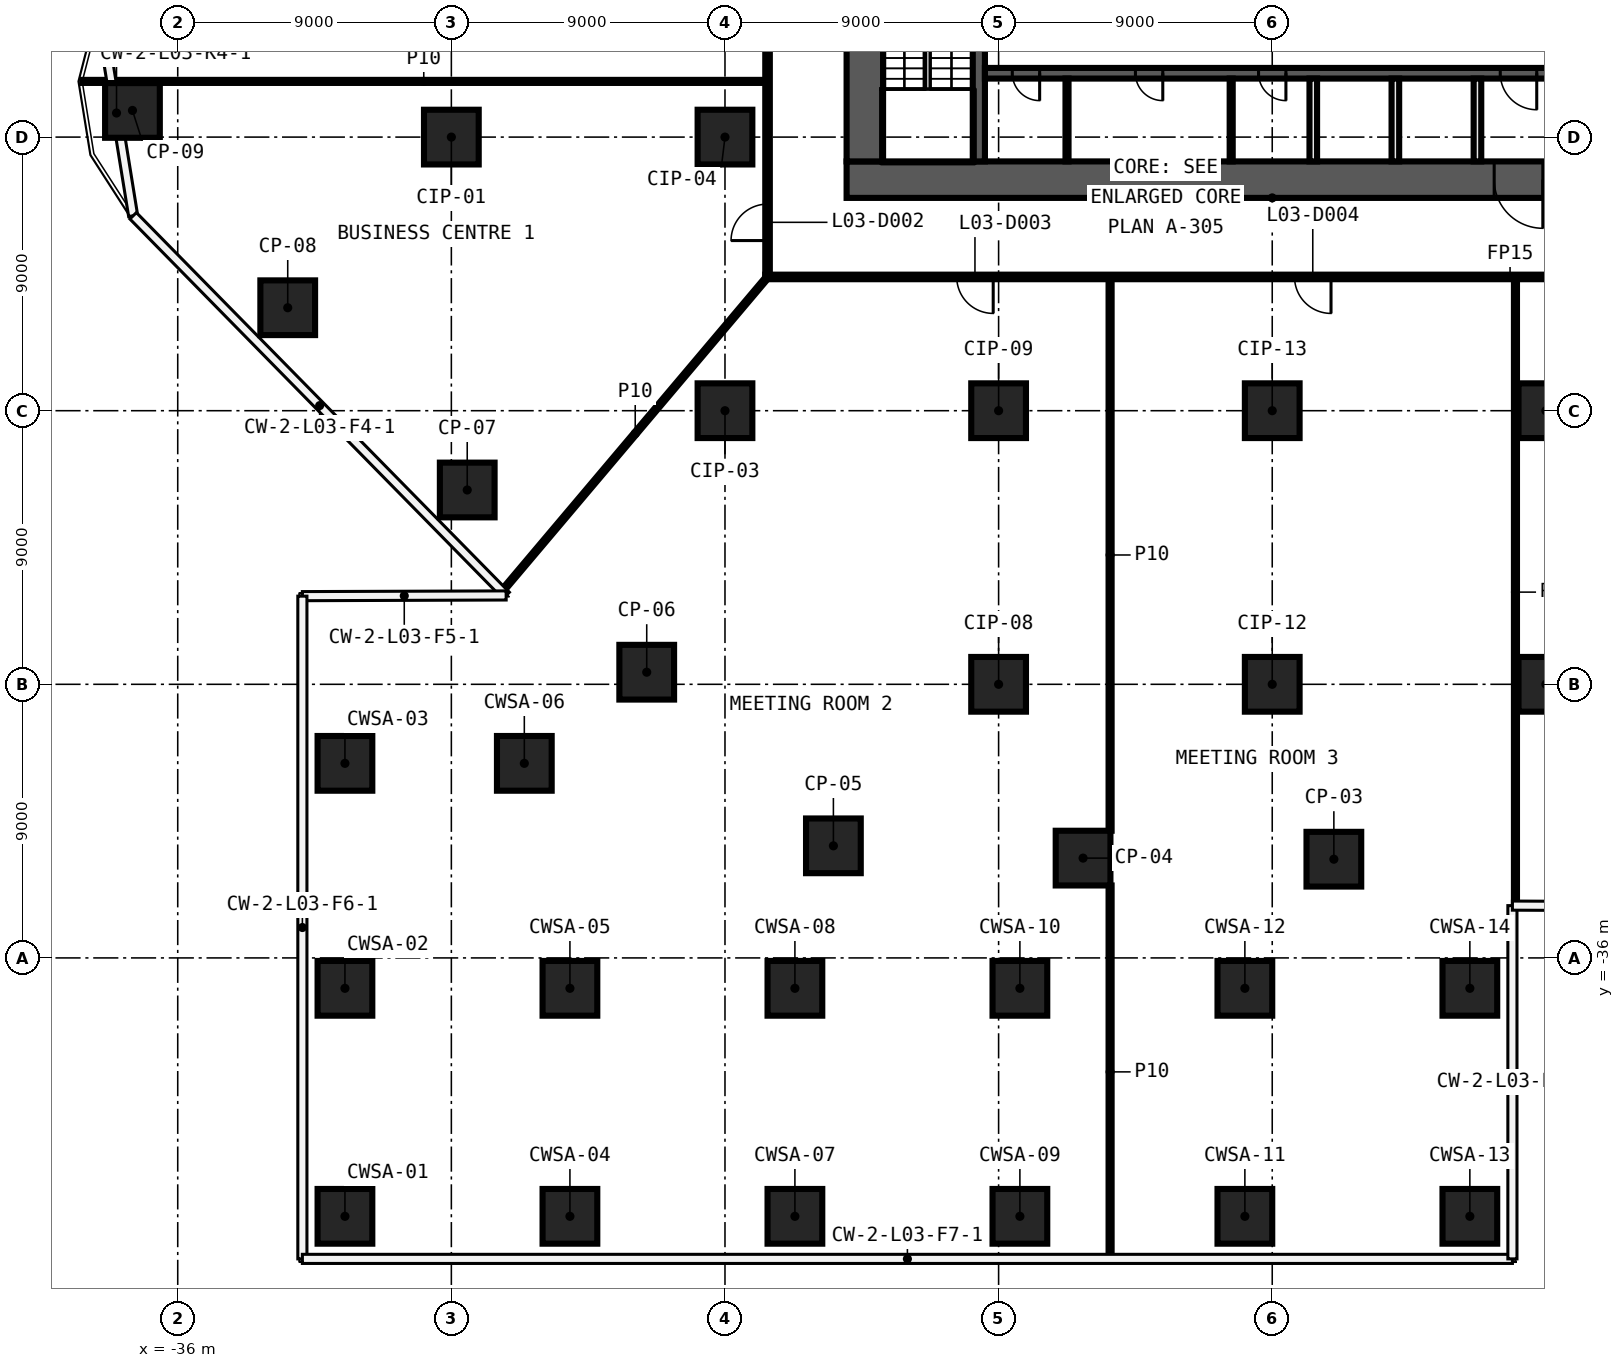
"""IFC4 building model, lengths in metres.
Left out: names, types, materials, properties, quantities, classifications, styles, units other than length and angle.
Written with IfcOpenShell. Run it as: python <this file> out.ifc"""

import sys

from ifc_helpers import new_model, si_unit, direction, frame, frame_2d, origin, origin_2d, place, context, subcontext, project, spatial, rectangle, extrude, element, fill, save


model = new_model("IFC4")
c1 = context("Model", 3, precision=1e-05, world=origin(), true_north=direction((0.0, 1.0)))
c2 = subcontext(c1, "Body", "Model", "MODEL_VIEW")
j1 = project(units=[si_unit("LENGTHUNIT", "METRE"), si_unit("PLANEANGLEUNIT", "RADIAN")], contexts=[c1])
p1 = place(None, origin())
s1 = spatial("IfcSite", under=j1, at=p1, CompositionType="ELEMENT")
p2 = place(p1, origin())
s2 = spatial("IfcBuilding", under=s1, at=p2, CompositionType="ELEMENT")
p3 = place(p2, frame((0.0, 0.0, 27.0)))
s3 = spatial("IfcBuildingStorey", under=s2, at=p3, CompositionType="ELEMENT", Elevation=27.0)
for number, where, z_axis, x_axis in (
    (1, (2.027, -32.753, 0.0), (0.0, 0.0, 1.0), (1.0, 0.0, 0.0)),
    (2, (-6.222, -32.717, 0.0), (0.0, 0.0, 1.0), (1.0, 0.0, 0.0)),
    (3, (-14.434, -32.313, 0.0), (0.0, 0.0, 1.0), (1.0, 0.0, 0.0)),
    (4, (-20.574, -26.602, 0.0), (0.0, 0.0, 1.0), (1.0, 0.0, 0.0)),
    (5, (-26.478, -20.608, 0.0), (0.0, 0.0, 1.0), (1.0, 0.0, 0.0)),
    (6, (-32.382, -14.613, 0.0), (0.0, 0.0, 1.0), (1.0, 0.0, 0.0)),
    (7, (-37.489, -8.123, 0.0), (0.0, 0.0, 1.0), (1.0, 0.0, 0.0)),
    (8, (-27.0, -9.0, 0.0), (0.0, 0.0, 1.0), (1.0, 0.0, 0.0)),
    (9, (-18.0, -18.0, 0.0), (0.0, 0.0, 1.0), (1.0, 0.0, 0.0)),
    (10, (-18.0, -9.0, 0.0), (0.0, 0.0, 1.0), (1.0, 0.0, 0.0)),
    (11, (-9.0, -27.0, 0.0), (0.0, 0.0, 1.0), (1.0, 0.0, 0.0)),
    (12, (-9.0, -18.0, 0.0), (0.0, 0.0, 1.0), (1.0, 0.0, 0.0)),
    (13, (0.0, -27.0, 0.0), (0.0, 0.0, 1.0), (1.0, 0.0, 0.0)),
    (14, (0.0, -18.0, 0.0), (0.0, 0.0, 1.0), (1.0, 0.0, 0.0)),
    (15, (9.0, -27.0, 0.0), (0.0, 0.0, 1.0), (1.0, 0.0, 0.0)),
    (16, (9.0, -18.0, 0.0), (0.0, 0.0, 1.0), (1.0, 0.0, 0.0)),
    (17, (-30.5, -44.5, 0.0), (0.0, 0.0, 1.0), (1.0, 0.0, 0.0)),
    (18, (-30.5, -37.0, 0.0), (0.0, 0.0, 1.0), (1.0, 0.0, 0.0)),
    (19, (-30.5, -29.6, 0.0), (0.0, 0.0, 1.0), (1.0, 0.0, 0.0)),
    (20, (-23.1, -44.5, 0.0), (0.0, 0.0, 1.0), (1.0, 0.0, 0.0)),
    (21, (-23.1, -37.0, 0.0), (0.0, 0.0, 1.0), (1.0, 0.0, 0.0)),
    (22, (-24.6, -29.6, 0.0), (0.0, 0.0, 1.0), (1.0, 0.0, 0.0)),
    (23, (-15.7, -44.5, 0.0), (0.0, 0.0, 1.0), (1.0, 0.0, 0.0)),
    (24, (-15.7, -37.0, 0.0), (0.0, 0.0, 1.0), (1.0, 0.0, 0.0)),
    (25, (-8.3, -44.5, 0.0), (0.0, 0.0, 1.0), (1.0, 0.0, 0.0)),
    (26, (-8.3, -37.0, 0.0), (0.0, 0.0, 1.0), (1.0, 0.0, 0.0)),
    (27, (-0.9, -44.5, 0.0), (0.0, 0.0, 1.0), (1.0, 0.0, 0.0)),
    (28, (-0.9, -37.0, 0.0), (0.0, 0.0, 1.0), (1.0, 0.0, 0.0)),
    (29, (6.5, -44.5, 0.0), (0.0, 0.0, 1.0), (1.0, 0.0, 0.0)),
    (30, (6.5, -37.0, 0.0), (0.0, 0.0, 1.0), (1.0, 0.0, 0.0)),
):
    element("IfcColumn", number, at=place(p3, frame(where, z_axis=z_axis, x_axis=x_axis)), inside=s3, PredefinedType="COLUMN", context=c2, shape_type="SweptSolid", body=[
        extrude(rectangle(XDim=1.8, YDim=1.8, at=origin_2d()), origin(), (0.0, 0.0, 1.0), 5.55),
    ])
p4 = place(p3, frame((16.675, -13.6, 0.0), z_axis=(0.0, 0.0, 1.0), x_axis=(-1.0, 0.0, 0.0)))
e31 = element("IfcWall", 31, at=p4, inside=s3, PredefinedType="PARTITIONING", context=c2, shape_type="SweptSolid", body=[
    extrude(rectangle(XDim=33.35, YDim=0.15, at=frame_2d((16.675, 0.0))), origin(), (0.0, 0.0, 1.0), 5.55),
])
p5 = place(p4, frame((25.853, 0.0, 0.0)))
e32 = element("IfcOpeningElement", 32, at=p5, cuts=e31, PredefinedType="OPENING", context=c2, shape_type="SweptSolid", body=[
    extrude(rectangle(XDim=1.2, YDim=2.1, at=frame_2d((0.6, 1.05))), frame((0.0, 0.085, 0.0), z_axis=(0.0, -1.0, 0.0), x_axis=(1.0, 0.0, 0.0)), (0.0, 0.0, 1.0), 0.17),
])
p6 = place(p4, frame((14.742, 0.0, 0.0)))
e33 = element("IfcOpeningElement", 33, at=p6, cuts=e31, PredefinedType="OPENING", context=c2, shape_type="SweptSolid", body=[
    extrude(rectangle(XDim=1.2, YDim=2.1, at=frame_2d((0.6, 1.05))), frame((0.0, 0.085, 0.0), z_axis=(0.0, -1.0, 0.0), x_axis=(1.0, 0.0, 0.0)), (0.0, 0.0, 1.0), 0.17),
])
p7 = place(p4, frame((1.764, 0.0, 0.0)))
e34 = element("IfcOpeningElement", 34, at=p7, cuts=e31, PredefinedType="OPENING", context=c2, shape_type="SweptSolid", body=[
    extrude(rectangle(XDim=1.2, YDim=2.1, at=frame_2d((0.6, 1.05))), frame((0.0, 0.085, 0.0), z_axis=(0.0, -1.0, 0.0), x_axis=(1.0, 0.0, 0.0)), (0.0, 0.0, 1.0), 0.17),
])
p8 = place(p3, frame((-39.14, -7.168, 0.0), z_axis=(0.0, 0.0, 1.0), x_axis=(1.0, 0.0, 0.0)))
e35 = element("IfcWall", 35, at=p8, inside=s3, PredefinedType="PARTITIONING", context=c2, shape_type="SweptSolid", body=[
    extrude(rectangle(XDim=22.465, YDim=0.1, at=frame_2d((11.232, 0.0))), origin(), (0.0, 0.0, 1.0), 5.55),
])
p9 = place(p3, frame((-25.304, -23.908, 0.0), z_axis=(0.0, 0.0, 1.0), x_axis=(0.645188329464, 0.764023572623, 0.0)))
e36 = element("IfcWall", 36, at=p9, inside=s3, PredefinedType="PARTITIONING", context=c2, shape_type="SweptSolid", body=[
    extrude(rectangle(XDim=13.491, YDim=0.1, at=frame_2d((6.746, 0.0))), origin(), (0.0, 0.0, 1.0), 5.55),
])
p10 = place(p3, frame((8.0, -34.26, 0.0), z_axis=(0.0, 0.0, 1.0), x_axis=(0.0, 1.0, 0.0)))
e37 = element("IfcWall", 37, at=p10, inside=s3, PredefinedType="PARTITIONING", context=c2, shape_type="SweptSolid", body=[
    extrude(rectangle(XDim=20.585, YDim=0.1, at=frame_2d((10.292, 0.0))), origin(), (0.0, 0.0, 1.0), 5.55),
])
p11 = place(p3, frame((-5.333, -45.88, 0.0), z_axis=(0.0, 0.0, 1.0), x_axis=(0.0, 1.0, 0.0)))
e38 = element("IfcWall", 38, at=p11, inside=s3, PredefinedType="PARTITIONING", context=c2, shape_type="SweptSolid", body=[
    extrude(rectangle(XDim=12.263, YDim=0.1, at=frame_2d((6.131, 0.0))), origin(), (0.0, 0.0, 1.0), 5.55),
])
p12 = place(p3, frame((-5.333, -31.817, 0.0), z_axis=(0.0, 0.0, 1.0), x_axis=(0.0, 1.0, 0.0)))
e39 = element("IfcWall", 39, at=p12, inside=s3, PredefinedType="PARTITIONING", context=c2, shape_type="SweptSolid", body=[
    extrude(rectangle(XDim=18.142, YDim=0.1, at=frame_2d((9.071, 0.0))), origin(), (0.0, 0.0, 1.0), 5.55),
])
p13 = place(p3, frame((-16.6, -13.525, 0.0), z_axis=(0.0, 0.0, 1.0), x_axis=(0.0, 1.0, 0.0)))
e40 = element("IfcWall", 40, at=p13, inside=s3, PredefinedType="PARTITIONING", context=c2, shape_type="SweptSolid", body=[
    extrude(rectangle(XDim=27.05, YDim=0.15, at=frame_2d((13.525, 0.0))), origin(), (0.0, 0.0, 1.0), 5.55),
])
p14 = place(p13, frame((16.028, 0.0, 0.0)))
e41 = element("IfcOpeningElement", 41, at=p14, cuts=e40, PredefinedType="OPENING", context=c2, shape_type="SweptSolid", body=[
    extrude(rectangle(XDim=1.2, YDim=2.1, at=frame_2d((0.6, 1.05))), frame((0.0, 0.085, 0.0), z_axis=(0.0, -1.0, 0.0), x_axis=(1.0, 0.0, 0.0)), (0.0, 0.0, 1.0), 0.17),
])
p15 = place(p13, frame((1.121, 0.0, 0.0)))
e42 = element("IfcOpeningElement", 42, at=p15, cuts=e40, PredefinedType="OPENING", context=c2, shape_type="SweptSolid", body=[
    extrude(rectangle(XDim=1.2, YDim=2.1, at=frame_2d((0.6, 1.05))), frame((0.0, 0.085, 0.0), z_axis=(0.0, -1.0, 0.0), x_axis=(1.0, 0.0, 0.0)), (0.0, 0.0, 1.0), 0.17),
])
p16 = place(p13, frame((24.705, 0.0, 0.0)))
e43 = element("IfcOpeningElement", 43, at=p16, cuts=e40, PredefinedType="OPENING", context=c2, shape_type="SweptSolid", body=[
    extrude(rectangle(XDim=1.2, YDim=2.1, at=frame_2d((0.6, 1.05))), frame((0.0, 0.085, 0.0), z_axis=(0.0, -1.0, 0.0), x_axis=(1.0, 0.0, 0.0)), (0.0, 0.0, 1.0), 0.17),
])
p17 = place(p3, frame((14.0, -10.4, 0.0), z_axis=(0.0, 0.0, 1.0), x_axis=(-1.0, 0.0, 0.0)))
e44 = element("IfcWall", 44, at=p17, inside=s3, PredefinedType="SHEAR", context=c2, shape_type="SweptSolid", body=[
    extrude(rectangle(XDim=28.0, YDim=1.2, at=frame_2d((14.0, 0.0))), origin(), (0.0, 0.0, 1.0), 5.55),
])
p18 = place(p17, frame((5.1, 0.0, 0.0)))
e45 = element("IfcOpeningElement", 45, at=p18, cuts=e44, PredefinedType="OPENING", context=c2, shape_type="SweptSolid", body=[
    extrude(rectangle(XDim=1.6, YDim=2.1, at=frame_2d((0.8, 1.05))), frame((0.0, 0.61, 0.0), z_axis=(0.0, -1.0, 0.0), x_axis=(1.0, 0.0, 0.0)), (0.0, 0.0, 1.0), 1.22),
])
p19 = place(p3, frame((-13.4, -9.8, 0.0), z_axis=(0.0, 0.0, 1.0), x_axis=(0.0, 1.0, 0.0)))
e46 = element("IfcWall", 46, at=p19, inside=s3, PredefinedType="SHEAR", context=c2, shape_type="SweptSolid", body=[
    extrude(rectangle(XDim=19.6, YDim=1.2, at=frame_2d((9.8, 0.0))), origin(), (0.0, 0.0, 1.0), 5.55),
])
p20 = place(p3, frame((-9.65, -9.8, 0.0), z_axis=(0.0, 0.0, 1.0), x_axis=(0.0, 1.0, 0.0)))
e47 = element("IfcWall", 47, at=p20, inside=s3, PredefinedType="SHEAR", context=c2, shape_type="SweptSolid", body=[
    extrude(rectangle(XDim=7.5, YDim=0.4, at=frame_2d((3.75, 0.0))), origin(), (0.0, 0.0, 1.0), 5.55),
])
p21 = place(p20, frame((5.1, 0.0, 0.0)))
e48 = element("IfcOpeningElement", 48, at=p21, cuts=e47, PredefinedType="OPENING", context=c2, shape_type="SweptSolid", body=[
    extrude(rectangle(XDim=1.2, YDim=2.1, at=frame_2d((0.6, 1.05))), frame((0.0, 0.21, 0.0), z_axis=(0.0, -1.0, 0.0), x_axis=(1.0, 0.0, 0.0)), (0.0, 0.0, 1.0), 0.42),
])
p22 = place(p3, frame((9.45, -6.9, 0.0), z_axis=(0.0, 0.0, 1.0), x_axis=(-1.0, 0.0, 0.0)))
e49 = element("IfcWall", 49, at=p22, inside=s3, PredefinedType="SHEAR", context=c2, shape_type="SweptSolid", body=[
    extrude(rectangle(XDim=18.9, YDim=0.35, at=frame_2d((9.45, 0.0))), origin(), (0.0, 0.0, 1.0), 5.55),
])
p23 = place(p22, frame((0.75, 0.0, 0.0)))
e50 = element("IfcOpeningElement", 50, at=p23, cuts=e49, PredefinedType="OPENING", context=c2, shape_type="SweptSolid", body=[
    extrude(rectangle(XDim=1.2, YDim=2.1, at=frame_2d((0.6, 1.05))), frame((0.0, 0.185, 0.0), z_axis=(0.0, -1.0, 0.0), x_axis=(1.0, 0.0, 0.0)), (0.0, 0.0, 1.0), 0.37),
])
p24 = place(p22, frame((17.1, 0.0, 0.0)))
e51 = element("IfcOpeningElement", 51, at=p24, cuts=e49, PredefinedType="OPENING", context=c2, shape_type="SweptSolid", body=[
    extrude(rectangle(XDim=0.9, YDim=2.1, at=frame_2d((0.45, 1.05))), frame((0.0, 0.185, 0.0), z_axis=(0.0, -1.0, 0.0), x_axis=(1.0, 0.0, 0.0)), (0.0, 0.0, 1.0), 0.37),
])
p25 = place(p22, frame((13.05, 0.0, 0.0)))
e52 = element("IfcOpeningElement", 52, at=p25, cuts=e49, PredefinedType="OPENING", context=c2, shape_type="SweptSolid", body=[
    extrude(rectangle(XDim=0.9, YDim=2.1, at=frame_2d((0.45, 1.05))), frame((0.0, 0.185, 0.0), z_axis=(0.0, -1.0, 0.0), x_axis=(1.0, 0.0, 0.0)), (0.0, 0.0, 1.0), 0.37),
])
p26 = place(p22, frame((9.0, 0.0, 0.0)))
e53 = element("IfcOpeningElement", 53, at=p26, cuts=e49, PredefinedType="OPENING", context=c2, shape_type="SweptSolid", body=[
    extrude(rectangle(XDim=0.9, YDim=2.1, at=frame_2d((0.45, 1.05))), frame((0.0, 0.185, 0.0), z_axis=(0.0, -1.0, 0.0), x_axis=(1.0, 0.0, 0.0)), (0.0, 0.0, 1.0), 0.37),
])
for number, where, z_axis, x_axis in (
    (54, (6.75, -9.8, 0.0), (0.0, 0.0, 1.0), (0.0, 1.0, 0.0)),
    (55, (4.05, -9.8, 0.0), (0.0, 0.0, 1.0), (0.0, 1.0, 0.0)),
    (56, (1.35, -9.8, 0.0), (0.0, 0.0, 1.0), (0.0, 1.0, 0.0)),
):
    element("IfcWall", number, at=place(p3, frame(where, z_axis=z_axis, x_axis=x_axis)), inside=s3, PredefinedType="SOLIDWALL", context=c2, shape_type="SweptSolid", body=[
        extrude(rectangle(XDim=2.725, YDim=0.25, at=frame_2d((1.363, 0.0))), origin(), (0.0, 0.0, 1.0), 5.55),
    ])
for number, where, z_axis, x_axis in (
    (57, (-1.35, -9.8, 0.0), (0.0, 0.0, 1.0), (0.0, 1.0, 0.0)),
    (58, (-6.75, -9.8, 0.0), (0.0, 0.0, 1.0), (0.0, 1.0, 0.0)),
):
    element("IfcWall", number, at=place(p3, frame(where, z_axis=z_axis, x_axis=x_axis)), inside=s3, PredefinedType="PARTITIONING", context=c2, shape_type="SweptSolid", body=[
        extrude(rectangle(XDim=2.725, YDim=0.1, at=frame_2d((1.363, 0.0))), origin(), (0.0, 0.0, 1.0), 5.55),
    ])
p27 = place(p15, origin())
e59 = element("IfcDoor", 59, at=p27, inside=s3, OperationType="SINGLE_SWING_LEFT", PredefinedType="DOOR", context=c2, shape_type="SweptSolid", body=[
    extrude(rectangle(XDim=1.2, YDim=2.1, at=frame_2d((0.6, 1.05))), frame((0.0, 0.025, 0.0), z_axis=(0.0, -1.0, 0.0), x_axis=(1.0, 0.0, 0.0)), (0.0, 0.0, 1.0), 0.05),
])
fill(e42, e59)
p28 = place(p5, origin())
e60 = element("IfcDoor", 60, at=p28, inside=s3, OperationType="SINGLE_SWING_RIGHT", PredefinedType="DOOR", context=c2, shape_type="SweptSolid", body=[
    extrude(rectangle(XDim=1.2, YDim=2.1, at=frame_2d((0.6, 1.05))), frame((0.0, 0.025, 0.0), z_axis=(0.0, -1.0, 0.0), x_axis=(1.0, 0.0, 0.0)), (0.0, 0.0, 1.0), 0.05),
])
fill(e32, e60)
p29 = place(p6, origin())
e61 = element("IfcDoor", 61, at=p29, inside=s3, OperationType="SINGLE_SWING_LEFT", PredefinedType="DOOR", context=c2, shape_type="SweptSolid", body=[
    extrude(rectangle(XDim=1.2, YDim=2.1, at=frame_2d((0.6, 1.05))), frame((0.0, 0.025, 0.0), z_axis=(0.0, -1.0, 0.0), x_axis=(1.0, 0.0, 0.0)), (0.0, 0.0, 1.0), 0.05),
])
fill(e33, e61)
p30 = place(p18, origin())
e62 = element("IfcDoor", 62, at=p30, inside=s3, OperationType="DOUBLE_DOOR_SINGLE_SWING", PredefinedType="DOOR", context=c2, shape_type="SweptSolid", body=[
    extrude(rectangle(XDim=1.6, YDim=2.1, at=frame_2d((0.8, 1.05))), frame((0.0, 0.025, 0.0), z_axis=(0.0, -1.0, 0.0), x_axis=(1.0, 0.0, 0.0)), (0.0, 0.0, 1.0), 0.05),
])
fill(e45, e62)
p31 = place(p23, origin())
e63 = element("IfcDoor", 63, at=p31, inside=s3, OperationType="SINGLE_SWING_LEFT", PredefinedType="DOOR", context=c2, shape_type="SweptSolid", body=[
    extrude(rectangle(XDim=1.2, YDim=2.1, at=frame_2d((0.6, 1.05))), frame((0.0, 0.025, 0.0), z_axis=(0.0, -1.0, 0.0), x_axis=(1.0, 0.0, 0.0)), (0.0, 0.0, 1.0), 0.05),
])
fill(e50, e63)
p32 = place(p24, origin())
e64 = element("IfcDoor", 64, at=p32, inside=s3, OperationType="SINGLE_SWING_RIGHT", PredefinedType="DOOR", context=c2, shape_type="SweptSolid", body=[
    extrude(rectangle(XDim=0.9, YDim=2.1, at=frame_2d((0.45, 1.05))), frame((0.0, 0.025, 0.0), z_axis=(0.0, -1.0, 0.0), x_axis=(1.0, 0.0, 0.0)), (0.0, 0.0, 1.0), 0.05),
])
fill(e51, e64)
p33 = place(p25, origin())
e65 = element("IfcDoor", 65, at=p33, inside=s3, OperationType="SINGLE_SWING_LEFT", PredefinedType="DOOR", context=c2, shape_type="SweptSolid", body=[
    extrude(rectangle(XDim=0.9, YDim=2.1, at=frame_2d((0.45, 1.05))), frame((0.0, 0.025, 0.0), z_axis=(0.0, -1.0, 0.0), x_axis=(1.0, 0.0, 0.0)), (0.0, 0.0, 1.0), 0.05),
])
fill(e52, e65)
p34 = place(p26, origin())
e66 = element("IfcDoor", 66, at=p34, inside=s3, OperationType="SINGLE_SWING_RIGHT", PredefinedType="DOOR", context=c2, shape_type="SweptSolid", body=[
    extrude(rectangle(XDim=0.9, YDim=2.1, at=frame_2d((0.45, 1.05))), frame((0.0, 0.025, 0.0), z_axis=(0.0, -1.0, 0.0), x_axis=(1.0, 0.0, 0.0)), (0.0, 0.0, 1.0), 0.05),
])
fill(e53, e66)
save(model, sys.argv[1])
